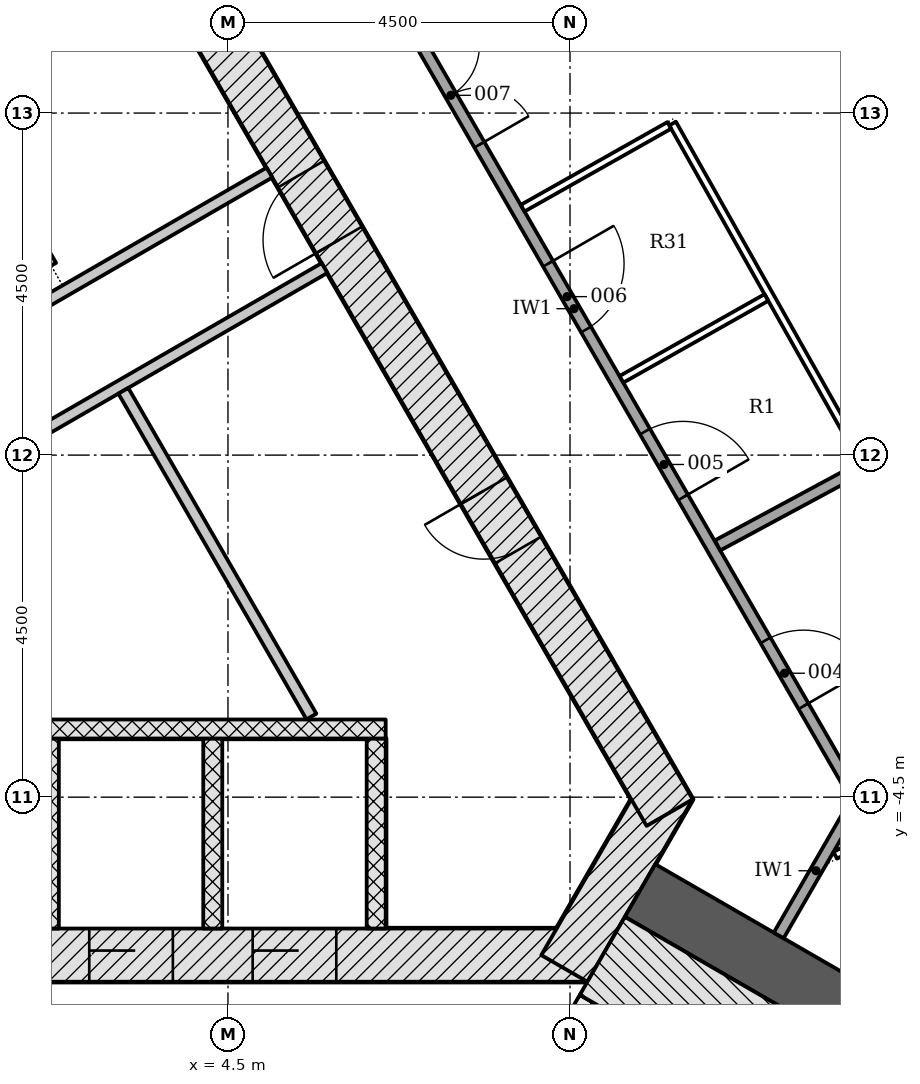
"""IFC4 building model, lengths in metres.
Left out: names, types, materials, properties, quantities, classifications, styles, units other than length and angle.
Written with IfcOpenShell. Run it as: python <this file> out.ifc"""

import sys

from ifc_helpers import new_model, si_unit, direction, frame, frame_2d, origin, place, context, subcontext, project, spatial, rectangle, extrude, element, fill, save


model = new_model("IFC4")
c1 = context("Model", 3, precision=1e-05, world=origin(), true_north=direction((0.0, 1.0)))
c2 = subcontext(c1, "Body", "Model", "MODEL_VIEW")
j1 = project(units=[si_unit("LENGTHUNIT", "METRE"), si_unit("PLANEANGLEUNIT", "RADIAN")], contexts=[c1])
p1 = place(None, origin())
s1 = spatial("IfcSite", under=j1, at=p1, CompositionType="ELEMENT")
p2 = place(p1, origin())
s2 = spatial("IfcBuilding", under=s1, at=p2, CompositionType="ELEMENT")
p3 = place(p2, frame((0.0, 0.0, 91.5)))
s3 = spatial("IfcBuildingStorey", under=s2, at=p3, CompositionType="ELEMENT", Elevation=91.5)
p4 = place(p3, frame((-9.229, -6.578, -0.2), z_axis=(0.0, 0.0, 1.0), x_axis=(1.0, 0.0, 0.0)))
e1 = element("IfcWall", 1, at=p4, inside=s3, PredefinedType="SHEAR", context=c2, shape_type="SweptSolid", body=[
    extrude(rectangle(XDim=18.458, YDim=0.7, at=frame_2d((9.229, 0.0))), origin(), (0.0, 0.0, 1.0), 3.6),
])
p5 = place(p4, frame((3.304, 0.0, 0.2)))
e2 = element("IfcOpeningElement", 2, at=p5, cuts=e1, PredefinedType="OPENING", context=c2, shape_type="SweptSolid", body=[
    extrude(rectangle(XDim=1.1, YDim=2.1, at=frame_2d((0.55, 1.05))), frame((0.0, 0.36, 0.0), z_axis=(0.0, -1.0, 0.0), x_axis=(1.0, 0.0, 0.0)), (0.0, 0.0, 1.0), 0.72),
])
p6 = place(p4, frame((5.454, 0.0, 0.2)))
e3 = element("IfcOpeningElement", 3, at=p6, cuts=e1, PredefinedType="OPENING", context=c2, shape_type="SweptSolid", body=[
    extrude(rectangle(XDim=1.1, YDim=2.1, at=frame_2d((0.55, 1.05))), frame((0.0, 0.36, 0.0), z_axis=(0.0, -1.0, 0.0), x_axis=(1.0, 0.0, 0.0)), (0.0, 0.0, 1.0), 0.72),
])
p7 = place(p4, frame((7.604, 0.0, 0.2)))
e4 = element("IfcOpeningElement", 4, at=p7, cuts=e1, PredefinedType="OPENING", context=c2, shape_type="SweptSolid", body=[
    extrude(rectangle(XDim=1.1, YDim=2.1, at=frame_2d((0.55, 1.05))), frame((0.0, 0.36, 0.0), z_axis=(0.0, -1.0, 0.0), x_axis=(1.0, 0.0, 0.0)), (0.0, 0.0, 1.0), 0.72),
])
p8 = place(p4, frame((9.754, 0.0, 0.2)))
e5 = element("IfcOpeningElement", 5, at=p8, cuts=e1, PredefinedType="OPENING", context=c2, shape_type="SweptSolid", body=[
    extrude(rectangle(XDim=1.1, YDim=2.1, at=frame_2d((0.55, 1.05))), frame((0.0, 0.36, 0.0), z_axis=(0.0, -1.0, 0.0), x_axis=(1.0, 0.0, 0.0)), (0.0, 0.0, 1.0), 0.72),
])
p9 = place(p4, frame((11.904, 0.0, 0.2)))
e6 = element("IfcOpeningElement", 6, at=p9, cuts=e1, PredefinedType="OPENING", context=c2, shape_type="SweptSolid", body=[
    extrude(rectangle(XDim=1.1, YDim=2.1, at=frame_2d((0.55, 1.05))), frame((0.0, 0.36, 0.0), z_axis=(0.0, -1.0, 0.0), x_axis=(1.0, 0.0, 0.0)), (0.0, 0.0, 1.0), 0.72),
])
p10 = place(p4, frame((14.054, 0.0, 0.2)))
e7 = element("IfcOpeningElement", 7, at=p10, cuts=e1, PredefinedType="OPENING", context=c2, shape_type="SweptSolid", body=[
    extrude(rectangle(XDim=1.1, YDim=2.1, at=frame_2d((0.55, 1.05))), frame((0.0, 0.36, 0.0), z_axis=(0.0, -1.0, 0.0), x_axis=(1.0, 0.0, 0.0)), (0.0, 0.0, 1.0), 0.72),
])
p11 = place(p4, frame((1.079, 0.0, 0.2)))
e8 = element("IfcOpeningElement", 8, at=p11, cuts=e1, PredefinedType="OPENING", context=c2, shape_type="SweptSolid", body=[
    extrude(rectangle(XDim=0.9, YDim=2.1, at=frame_2d((0.45, 1.05))), frame((0.0, 0.36, 0.0), z_axis=(0.0, -1.0, 0.0), x_axis=(1.0, 0.0, 0.0)), (0.0, 0.0, 1.0), 0.72),
])
p12 = place(p3, frame((8.926, -6.753, -0.2), z_axis=(0.0, 0.0, 1.0), x_axis=(0.500042739161, 0.866000726912, 0.0)))
e9 = element("IfcWall", 9, at=p12, inside=s3, PredefinedType="SHEAR", context=c2, shape_type="SweptSolid", body=[
    extrude(rectangle(XDim=2.771, YDim=0.7, at=frame_2d((1.386, 0.0))), origin(), (0.0, 0.0, 1.0), 3.6),
])
p13 = place(p3, frame((10.311, -4.703, -0.2), z_axis=(0.0, 0.0, 1.0), x_axis=(-0.500001446645, 0.866024568562, 0.0)))
e10 = element("IfcWall", 10, at=p13, inside=s3, PredefinedType="SHEAR", context=c2, shape_type="SweptSolid", body=[
    extrude(rectangle(XDim=18.458, YDim=0.7, at=frame_2d((9.229, 0.0))), origin(), (0.0, 0.0, 1.0), 3.6),
])
p14 = place(p13, frame((8.7, 0.0, 0.2)))
e11 = element("IfcOpeningElement", 11, at=p14, cuts=e10, PredefinedType="OPENING", context=c2, shape_type="SweptSolid", body=[
    extrude(rectangle(XDim=1.0, YDim=2.1, at=frame_2d((0.5, 1.05))), frame((0.0, 0.36, 0.0), z_axis=(0.0, -1.0, 0.0), x_axis=(1.0, 0.0, 0.0)), (0.0, 0.0, 1.0), 0.72),
])
p15 = place(p13, frame((3.99, 0.0, 0.2)))
e12 = element("IfcOpeningElement", 12, at=p15, cuts=e10, PredefinedType="OPENING", context=c2, shape_type="SweptSolid", body=[
    extrude(rectangle(XDim=0.9, YDim=2.1, at=frame_2d((0.45, 1.05))), frame((0.0, 0.36, 0.0), z_axis=(0.0, -1.0, 0.0), x_axis=(1.0, 0.0, 0.0)), (0.0, 0.0, 1.0), 0.72),
])
p16 = place(p13, frame((13.539, 0.0, 0.2)))
e13 = element("IfcOpeningElement", 13, at=p16, cuts=e10, PredefinedType="OPENING", context=c2, shape_type="SweptSolid", body=[
    extrude(rectangle(XDim=0.9, YDim=2.1, at=frame_2d((0.45, 1.05))), frame((0.0, 0.36, 0.0), z_axis=(0.0, -1.0, 0.0), x_axis=(1.0, 0.0, 0.0)), (0.0, 0.0, 1.0), 0.72),
])
p17 = place(p3, frame((9.922, -5.728, -0.2), z_axis=(0.0, 0.0, 1.0), x_axis=(0.866029086277, -0.499993621681, 0.0)))
e14 = element("IfcWall", 14, at=p17, inside=s3, PredefinedType="SHEAR", context=c2, shape_type="SweptSolid", body=[
    extrude(rectangle(XDim=12.677, YDim=0.8, at=frame_2d((6.339, 0.0))), origin(), (0.0, 0.0, 1.0), 3.6),
])
for number, where, z_axis, x_axis in (
    (15, (2.15, -6.228, -0.2), (0.0, 0.0, 1.0), (0.0, 1.0, 0.0)),
    (16, (4.3, -6.228, -0.2), (0.0, 0.0, 1.0), (0.0, 1.0, 0.0)),
    (17, (6.45, -6.228, -0.2), (0.0, 0.0, 1.0), (0.0, 1.0, 0.0)),
):
    element("IfcWall", number, at=place(p3, frame(where, z_axis=z_axis, x_axis=x_axis)), inside=s3, PredefinedType="PARTITIONING", context=c2, shape_type="SweptSolid", body=[
        extrude(rectangle(XDim=2.5, YDim=0.25, at=frame_2d((1.25, 0.0))), origin(), (0.0, 0.0, 1.0), 3.6),
    ])
p18 = place(p3, frame((-6.575, -3.603, 0.0), z_axis=(0.0, 0.0, 1.0), x_axis=(1.0, 0.0, 0.0)))
e18 = element("IfcWall", 18, at=p18, inside=s3, PredefinedType="PARTITIONING", context=c2, shape_type="SweptSolid", body=[
    extrude(rectangle(XDim=13.15, YDim=0.25, at=frame_2d((6.575, 0.0))), origin(), (0.0, 0.0, 1.0), 3.4),
])
p19 = place(p3, frame((-4.523, -1.807, 0.0), z_axis=(0.0, 0.0, 1.0), x_axis=(0.866030300338, 0.499991518824, 0.0)))
e19 = element("IfcWall", 19, at=p19, inside=s3, PredefinedType="PARTITIONING", context=c2, shape_type="SweptSolid", body=[
    extrude(rectangle(XDim=11.049, YDim=0.15, at=frame_2d((5.524, 0.0))), origin(), (0.0, 0.0, 1.0), 3.4),
])
p20 = place(p19, frame((3.525, 0.0, 0.0)))
e20 = element("IfcOpeningElement", 20, at=p20, cuts=e19, PredefinedType="OPENING", context=c2, shape_type="SweptSolid", body=[
    extrude(rectangle(XDim=0.9, YDim=2.1, at=frame_2d((0.45, 1.05))), frame((0.0, 0.085, 0.0), z_axis=(0.0, -1.0, 0.0), x_axis=(1.0, 0.0, 0.0)), (0.0, 0.0, 1.0), 0.17),
])
p21 = place(p3, frame((-4.404, -3.413, 0.0), z_axis=(0.0, 0.0, 1.0), x_axis=(0.866022252853, 0.500005457533, 0.0)))
e21 = element("IfcWall", 21, at=p21, inside=s3, PredefinedType="PARTITIONING", context=c2, shape_type="SweptSolid", body=[
    extrude(rectangle(XDim=11.749, YDim=0.15, at=frame_2d((5.875, 0.0))), origin(), (0.0, 0.0, 1.0), 3.4),
])
p22 = place(p21, frame((3.875, 0.0, 0.0)))
e22 = element("IfcOpeningElement", 22, at=p22, cuts=e21, PredefinedType="OPENING", context=c2, shape_type="SweptSolid", body=[
    extrude(rectangle(XDim=0.9, YDim=2.1, at=frame_2d((0.45, 1.05))), frame((0.0, 0.085, 0.0), z_axis=(0.0, -1.0, 0.0), x_axis=(1.0, 0.0, 0.0)), (0.0, 0.0, 1.0), 0.17),
])
p23 = place(p3, frame((2.174, 2.492, 0.0), z_axis=(0.0, 0.0, 1.0), x_axis=(-0.499999641798, 0.866025610592, 0.0)))
e23 = element("IfcWall", 23, at=p23, inside=s3, PredefinedType="PARTITIONING", context=c2, shape_type="SweptSolid", body=[
    extrude(rectangle(XDim=4.244, YDim=0.15, at=frame_2d((2.122, 0.0))), origin(), (0.0, 0.0, 1.0), 3.4),
])
p24 = place(p3, frame((5.598, -3.439, 0.0), z_axis=(0.0, 0.0, 1.0), x_axis=(-0.500007155043, 0.866021272779, 0.0)))
e24 = element("IfcWall", 24, at=p24, inside=s3, PredefinedType="PARTITIONING", context=c2, shape_type="SweptSolid", body=[
    extrude(rectangle(XDim=4.949, YDim=0.15, at=frame_2d((2.474, 0.0))), origin(), (0.0, 0.0, 1.0), 3.4),
])
p25 = place(p3, frame((7.44, -10.226, -0.2), z_axis=(0.0, 0.0, 1.0), x_axis=(0.500022077904, 0.866012656725, 0.0)))
e25 = element("IfcWall", 25, at=p25, inside=s3, PredefinedType="SHEAR", context=c2, shape_type="SweptSolid", body=[
    extrude(rectangle(XDim=3.55, YDim=0.2, at=frame_2d((1.775, 0.0))), origin(), (0.0, 0.0, 1.0), 3.6),
])
p26 = place(p25, frame((1.175, 0.0, 0.2)))
e26 = element("IfcOpeningElement", 26, at=p26, cuts=e25, PredefinedType="OPENING", context=c2, shape_type="SweptSolid", body=[
    extrude(rectangle(XDim=1.2, YDim=2.1, at=frame_2d((0.6, 1.05))), frame((0.0, 0.11, 0.0), z_axis=(0.0, -1.0, 0.0), x_axis=(1.0, 0.0, 0.0)), (0.0, 0.0, 1.0), 0.22),
])
p27 = place(p3, frame((9.425, -6.588, -0.2), z_axis=(0.0, 0.0, 1.0), x_axis=(0.866018442252, -0.500012057535, 0.0)))
e27 = element("IfcWall", 27, at=p27, inside=s3, PredefinedType="SHEAR", context=c2, shape_type="SweptSolid", body=[
    extrude(rectangle(XDim=7.2, YDim=1.186, at=frame_2d((3.6, 0.0))), origin(), (0.0, 0.0, 1.0), 3.6),
])
p28 = place(p3, frame((5.289, 8.446, 0.0), z_axis=(0.0, 0.0, 1.0), x_axis=(0.499996620721, -0.866027354803, 0.0)))
e28 = element("IfcWall", 28, at=p28, inside=s3, PredefinedType="PARTITIONING", context=c2, shape_type="SweptSolid", body=[
    extrude(rectangle(XDim=15.057, YDim=0.15, at=frame_2d((7.528, 0.0))), origin(), (0.0, 0.0, 1.0), 2.778),
])
p29 = place(p28, frame((12.566, 0.0, 0.0)))
e29 = element("IfcOpeningElement", 29, at=p29, cuts=e28, PredefinedType="OPENING", context=c2, shape_type="SweptSolid", body=[
    extrude(rectangle(XDim=1.0, YDim=2.1, at=frame_2d((0.5, 1.05))), frame((0.0, 0.085, 0.0), z_axis=(0.0, -1.0, 0.0), x_axis=(1.0, 0.0, 0.0)), (0.0, 0.0, 1.0), 0.17),
])
p30 = place(p28, frame((9.395, 0.0, 0.0)))
e30 = element("IfcOpeningElement", 30, at=p30, cuts=e28, PredefinedType="OPENING", context=c2, shape_type="SweptSolid", body=[
    extrude(rectangle(XDim=1.0, YDim=2.1, at=frame_2d((0.5, 1.05))), frame((0.0, 0.085, 0.0), z_axis=(0.0, -1.0, 0.0), x_axis=(1.0, 0.0, 0.0)), (0.0, 0.0, 1.0), 0.17),
])
p31 = place(p28, frame((6.845, 0.0, 0.0)))
e31 = element("IfcOpeningElement", 31, at=p31, cuts=e28, PredefinedType="OPENING", context=c2, shape_type="SweptSolid", body=[
    extrude(rectangle(XDim=1.0, YDim=2.1, at=frame_2d((0.5, 1.05))), frame((0.0, 0.085, 0.0), z_axis=(0.0, -1.0, 0.0), x_axis=(1.0, 0.0, 0.0)), (0.0, 0.0, 1.0), 0.17),
])
p32 = place(p28, frame((3.537, 0.0, 0.0)))
e32 = element("IfcOpeningElement", 32, at=p32, cuts=e28, PredefinedType="OPENING", context=c2, shape_type="SweptSolid", body=[
    extrude(rectangle(XDim=1.5, YDim=2.1, at=frame_2d((0.75, 1.05))), frame((0.0, 0.085, 0.0), z_axis=(0.0, -1.0, 0.0), x_axis=(1.0, 0.0, 0.0)), (0.0, 0.0, 1.0), 0.17),
])
p33 = place(p3, frame((11.745, -6.319, 0.0), z_axis=(0.0, 0.0, 1.0), x_axis=(0.500012721296, 0.866018059016, 0.0)))
e33 = element("IfcWall", 33, at=p33, inside=s3, PredefinedType="PARTITIONING", context=c2, shape_type="SweptSolid", body=[
    extrude(rectangle(XDim=1.966, YDim=0.15, at=frame_2d((0.983, 0.0))), origin(), (0.0, 0.0, 1.0), 2.778),
])
p34 = place(p3, frame((17.677, 2.44, 0.0), z_axis=(0.0, 0.0, 1.0), x_axis=(-0.880400392736, -0.47423111293, 0.0)))
e34 = element("IfcWall", 34, at=p34, inside=s3, PredefinedType="PARTITIONING", context=c2, shape_type="SweptSolid", body=[
    extrude(rectangle(XDim=7.651, YDim=0.15, at=frame_2d((3.826, 0.0))), origin(), (0.0, 0.0, 1.0), 2.778),
])
p35 = place(p3, frame((19.764, -1.529, 0.0), z_axis=(0.0, 0.0, 1.0), x_axis=(-0.889562755555, -0.456812985728, 0.0)))
e35 = element("IfcWall", 35, at=p35, inside=s3, PredefinedType="PARTITIONING", context=c2, shape_type="SweptSolid", body=[
    extrude(rectangle(XDim=8.177, YDim=0.1, at=frame_2d((4.089, 0.0))), origin(), (0.0, 0.0, 1.0), 2.778),
])
p36 = place(p35, frame((5.742, 0.0, 0.0)))
e36 = element("IfcOpeningElement", 36, at=p36, cuts=e35, PredefinedType="OPENING", context=c2, shape_type="SweptSolid", body=[
    extrude(rectangle(XDim=1.0, YDim=2.1, at=frame_2d((0.5, 1.05))), frame((0.0, 0.06, 0.0), z_axis=(0.0, -1.0, 0.0), x_axis=(1.0, 0.0, 0.0)), (0.0, 0.0, 1.0), 0.12),
])
p37 = place(p35, frame((1.635, 0.0, 0.0)))
e37 = element("IfcOpeningElement", 37, at=p37, cuts=e35, PredefinedType="OPENING", context=c2, shape_type="SweptSolid", body=[
    extrude(rectangle(XDim=1.0, YDim=2.1, at=frame_2d((0.5, 1.05))), frame((0.0, 0.06, 0.0), z_axis=(0.0, -1.0, 0.0), x_axis=(1.0, 0.0, 0.0)), (0.0, 0.0, 1.0), 0.12),
])
p38 = place(p3, frame((12.852, -0.073, 0.0), z_axis=(0.0, 0.0, 1.0), x_axis=(-0.491453614565, 0.870903751703, 0.0)))
e38 = element("IfcWall", 38, at=p38, inside=s3, PredefinedType="PARTITIONING", context=c2, shape_type="SweptSolid", body=[
    extrude(rectangle(XDim=5.092, YDim=0.1, at=frame_2d((2.546, 0.0))), origin(), (0.0, 0.0, 1.0), 2.778),
])
p39 = place(p3, frame((10.306, 4.337, 0.0), z_axis=(0.0, 0.0, 1.0), x_axis=(-0.870909527441, -0.491443379253, 0.0)))
e39 = element("IfcWall", 39, at=p39, inside=s3, PredefinedType="PARTITIONING", context=c2, shape_type="SweptSolid", body=[
    extrude(rectangle(XDim=2.215, YDim=0.1, at=frame_2d((1.107, 0.0))), origin(), (0.0, 0.0, 1.0), 3.4),
])
p40 = place(p3, frame((11.584, 2.073, 0.0), z_axis=(0.0, 0.0, 1.0), x_axis=(-0.870892816927, -0.491472991552, 0.0)))
e40 = element("IfcWall", 40, at=p40, inside=s3, PredefinedType="PARTITIONING", context=c2, shape_type="SweptSolid", body=[
    extrude(rectangle(XDim=2.19, YDim=0.1, at=frame_2d((1.095, 0.0))), origin(), (0.0, 0.0, 1.0), 3.4),
])
p41 = place(p9, origin())
e41 = element("IfcDoor", 41, at=p41, inside=s3, OperationType="DOUBLE_DOOR_SLIDING", PredefinedType="DOOR", context=c2, shape_type="SweptSolid", body=[
    extrude(rectangle(XDim=1.1, YDim=2.1, at=frame_2d((0.55, 1.05))), frame((0.0, 0.025, 0.0), z_axis=(0.0, -1.0, 0.0), x_axis=(1.0, 0.0, 0.0)), (0.0, 0.0, 1.0), 0.05),
])
fill(e6, e41)
p42 = place(p10, origin())
e42 = element("IfcDoor", 42, at=p42, inside=s3, OperationType="DOUBLE_DOOR_SLIDING", PredefinedType="DOOR", context=c2, shape_type="SweptSolid", body=[
    extrude(rectangle(XDim=1.1, YDim=2.1, at=frame_2d((0.55, 1.05))), frame((0.0, 0.025, 0.0), z_axis=(0.0, -1.0, 0.0), x_axis=(1.0, 0.0, 0.0)), (0.0, 0.0, 1.0), 0.05),
])
fill(e7, e42)
p43 = place(p14, origin())
e43 = element("IfcDoor", 43, at=p43, inside=s3, OperationType="SINGLE_SWING_LEFT", PredefinedType="DOOR", context=c2, shape_type="SweptSolid", body=[
    extrude(rectangle(XDim=1.0, YDim=2.1, at=frame_2d((0.5, 1.05))), frame((0.0, 0.075, 0.0), z_axis=(0.0, -1.0, 0.0), x_axis=(1.0, 0.0, 0.0)), (0.0, 0.0, 1.0), 0.15),
])
fill(e11, e43)
p44 = place(p15, origin())
e44 = element("IfcDoor", 44, at=p44, inside=s3, OperationType="SINGLE_SWING_RIGHT", PredefinedType="DOOR", context=c2, shape_type="SweptSolid", body=[
    extrude(rectangle(XDim=0.9, YDim=2.1, at=frame_2d((0.45, 1.05))), frame((0.0, 0.075, 0.0), z_axis=(0.0, -1.0, 0.0), x_axis=(1.0, 0.0, 0.0)), (0.0, 0.0, 1.0), 0.15),
])
fill(e12, e44)
p45 = place(p29, origin())
e45 = element("IfcDoor", 45, at=p45, inside=s3, OperationType="SINGLE_SWING_RIGHT", PredefinedType="DOOR", context=c2, shape_type="SweptSolid", body=[
    extrude(rectangle(XDim=1.0, YDim=2.1, at=frame_2d((0.5, 1.05))), frame((0.0, 0.025, 0.0), z_axis=(0.0, -1.0, 0.0), x_axis=(1.0, 0.0, 0.0)), (0.0, 0.0, 1.0), 0.05),
])
fill(e29, e45)
p46 = place(p30, origin())
e46 = element("IfcDoor", 46, at=p46, inside=s3, OperationType="SINGLE_SWING_RIGHT", PredefinedType="DOOR", context=c2, shape_type="SweptSolid", body=[
    extrude(rectangle(XDim=1.0, YDim=2.1, at=frame_2d((0.5, 1.05))), frame((0.0, 0.025, 0.0), z_axis=(0.0, -1.0, 0.0), x_axis=(1.0, 0.0, 0.0)), (0.0, 0.0, 1.0), 0.05),
])
fill(e30, e46)
p47 = place(p31, origin())
e47 = element("IfcDoor", 47, at=p47, inside=s3, OperationType="SINGLE_SWING_LEFT", PredefinedType="DOOR", context=c2, shape_type="SweptSolid", body=[
    extrude(rectangle(XDim=1.0, YDim=2.1, at=frame_2d((0.5, 1.05))), frame((0.0, 0.025, 0.0), z_axis=(0.0, -1.0, 0.0), x_axis=(1.0, 0.0, 0.0)), (0.0, 0.0, 1.0), 0.05),
])
fill(e31, e47)
p48 = place(p32, origin())
e48 = element("IfcDoor", 48, at=p48, inside=s3, OperationType="DOUBLE_DOOR_SINGLE_SWING", PredefinedType="DOOR", context=c2, shape_type="SweptSolid", body=[
    extrude(rectangle(XDim=1.5, YDim=2.1, at=frame_2d((0.75, 1.05))), frame((0.0, 0.025, 0.0), z_axis=(0.0, -1.0, 0.0), x_axis=(1.0, 0.0, 0.0)), (0.0, 0.0, 1.0), 0.05),
])
fill(e32, e48)
save(model, sys.argv[1])
